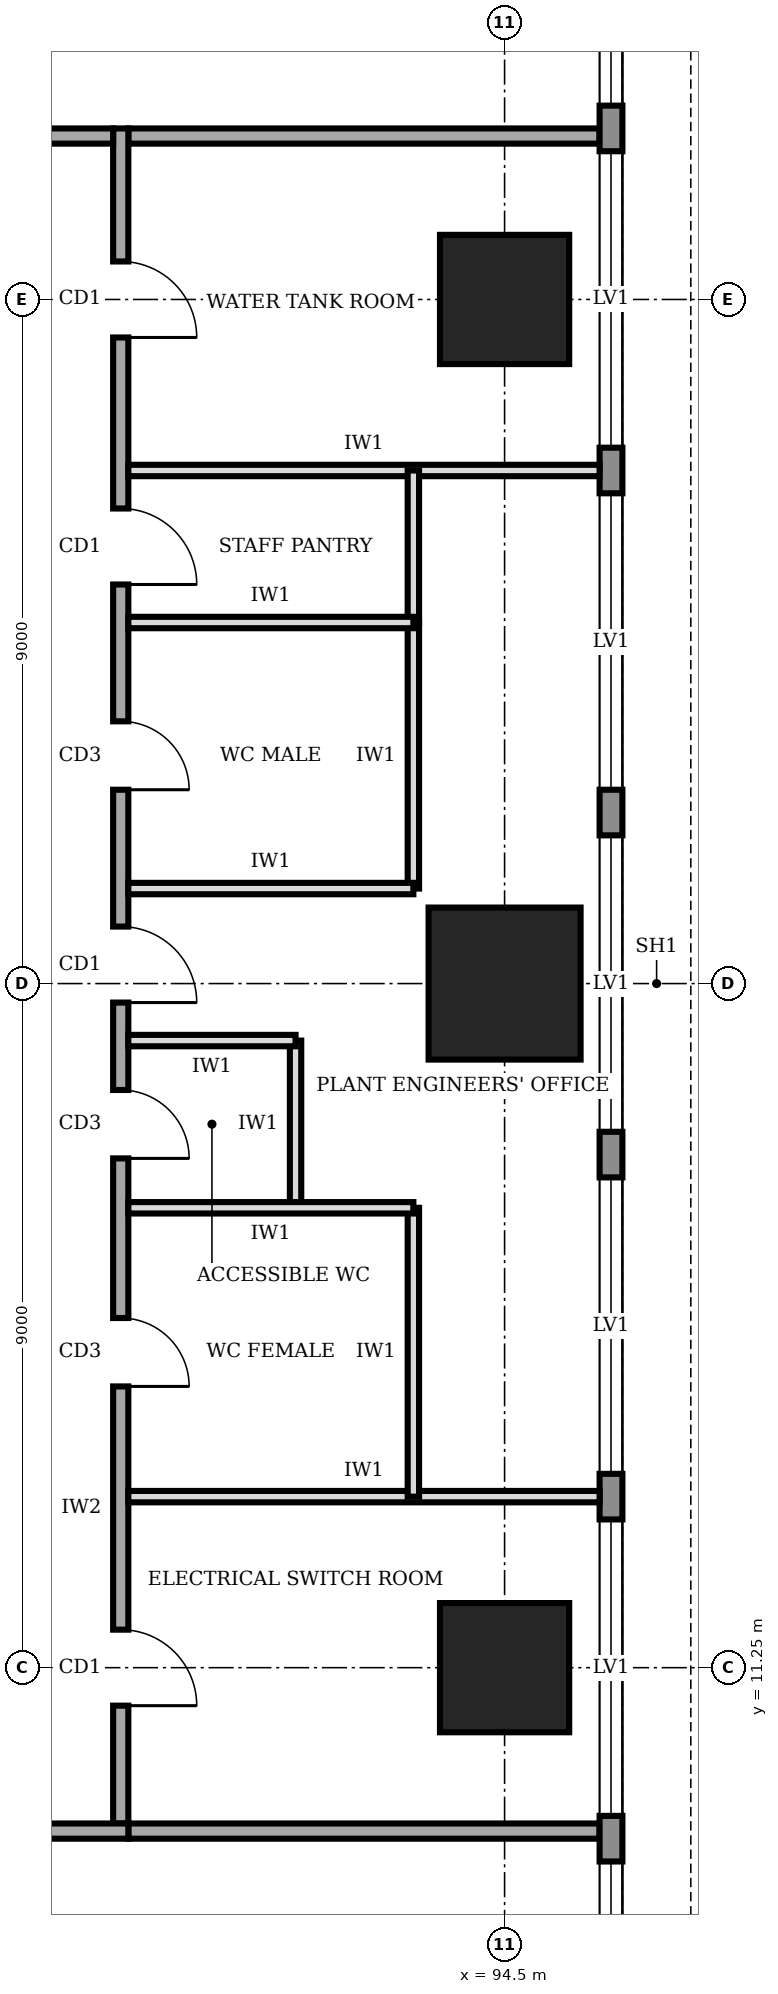
"""IFC4 building model, lengths in metres.
Left out: names, types, materials, properties, quantities, classifications, styles, units other than length and angle.
Written with IfcOpenShell. Run it as: python <this file> out.ifc"""

import sys

from ifc_helpers import new_model, si_unit, direction, frame, frame_2d, origin, origin_2d, place, context, subcontext, project, spatial, rectangle, extrude, element, fill, save


model = new_model("IFC4")
c1 = context("Model", 3, precision=1e-05, world=origin(), true_north=direction((0.0, 1.0)))
c2 = subcontext(c1, "Body", "Model", "MODEL_VIEW")
j1 = project(units=[si_unit("LENGTHUNIT", "METRE"), si_unit("PLANEANGLEUNIT", "RADIAN")], contexts=[c1])
p1 = place(None, origin())
s1 = spatial("IfcSite", under=j1, at=p1, CompositionType="ELEMENT")
p2 = place(p1, origin())
s2 = spatial("IfcBuilding", under=s1, at=p2, CompositionType="ELEMENT")
p3 = place(p2, frame((0.0, 0.0, 229.0)))
s3 = spatial("IfcBuildingStorey", under=s2, at=p3, CompositionType="ELEMENT", Elevation=229.0)
p4 = place(p3, frame((94.5, 11.25, 0.0), z_axis=(0.0, 0.0, 1.0), x_axis=(1.0, 0.0, 0.0)))
e1 = element("IfcColumn", 1, at=p4, inside=s3, PredefinedType="COLUMN", context=c2, shape_type="SweptSolid", body=[
    extrude(rectangle(XDim=1.7, YDim=1.7, at=origin_2d()), origin(), (0.0, 0.0, 1.0), 4.0),
])
p5 = place(p3, frame((94.5, 20.25, 0.0), z_axis=(0.0, 0.0, 1.0), x_axis=(1.0, 0.0, 0.0)))
e2 = element("IfcColumn", 2, at=p5, inside=s3, PredefinedType="COLUMN", context=c2, shape_type="SweptSolid", body=[
    extrude(rectangle(XDim=2.0, YDim=2.0, at=origin_2d()), origin(), (0.0, 0.0, 1.0), 4.0),
])
p6 = place(p3, frame((94.5, 29.25, 0.0), z_axis=(0.0, 0.0, 1.0), x_axis=(1.0, 0.0, 0.0)))
e3 = element("IfcColumn", 3, at=p6, inside=s3, PredefinedType="COLUMN", context=c2, shape_type="SweptSolid", body=[
    extrude(rectangle(XDim=1.7, YDim=1.7, at=origin_2d()), origin(), (0.0, 0.0, 1.0), 4.0),
])
p7 = place(p3, frame((95.9, 3.32, 0.0), z_axis=(0.0, 0.0, 1.0), x_axis=(0.0, 1.0, 0.0)))
e4 = element("IfcWall", 4, at=p7, inside=s3, PredefinedType="STANDARD", context=c2, shape_type="SweptSolid", body=[
    extrude(rectangle(XDim=33.86, YDim=0.3, at=frame_2d((16.93, 0.0))), origin(), (0.0, 0.0, 1.0), 3.75),
])
p8 = place(p7, frame((1.48, 0.0, 0.9)))
e5 = element("IfcOpeningElement", 5, at=p8, cuts=e4, PredefinedType="OPENING", context=c2, shape_type="SweptSolid", body=[
    extrude(rectangle(XDim=3.9, YDim=2.2, at=frame_2d((1.95, 1.1))), frame((0.0, 0.16, 0.0), z_axis=(0.0, -1.0, 0.0), x_axis=(1.0, 0.0, 0.0)), (0.0, 0.0, 1.0), 0.32),
])
p9 = place(p7, frame((5.98, 0.0, 0.9)))
e6 = element("IfcOpeningElement", 6, at=p9, cuts=e4, PredefinedType="OPENING", context=c2, shape_type="SweptSolid", body=[
    extrude(rectangle(XDim=3.9, YDim=2.2, at=frame_2d((1.95, 1.1))), frame((0.0, 0.16, 0.0), z_axis=(0.0, -1.0, 0.0), x_axis=(1.0, 0.0, 0.0)), (0.0, 0.0, 1.0), 0.32),
])
p10 = place(p7, frame((10.48, 0.0, 0.9)))
e7 = element("IfcOpeningElement", 7, at=p10, cuts=e4, PredefinedType="OPENING", context=c2, shape_type="SweptSolid", body=[
    extrude(rectangle(XDim=3.9, YDim=2.2, at=frame_2d((1.95, 1.1))), frame((0.0, 0.16, 0.0), z_axis=(0.0, -1.0, 0.0), x_axis=(1.0, 0.0, 0.0)), (0.0, 0.0, 1.0), 0.32),
])
p11 = place(p7, frame((14.98, 0.0, 0.9)))
e8 = element("IfcOpeningElement", 8, at=p11, cuts=e4, PredefinedType="OPENING", context=c2, shape_type="SweptSolid", body=[
    extrude(rectangle(XDim=3.9, YDim=2.2, at=frame_2d((1.95, 1.1))), frame((0.0, 0.16, 0.0), z_axis=(0.0, -1.0, 0.0), x_axis=(1.0, 0.0, 0.0)), (0.0, 0.0, 1.0), 0.32),
])
p12 = place(p7, frame((19.48, 0.0, 0.9)))
e9 = element("IfcOpeningElement", 9, at=p12, cuts=e4, PredefinedType="OPENING", context=c2, shape_type="SweptSolid", body=[
    extrude(rectangle(XDim=3.9, YDim=2.2, at=frame_2d((1.95, 1.1))), frame((0.0, 0.16, 0.0), z_axis=(0.0, -1.0, 0.0), x_axis=(1.0, 0.0, 0.0)), (0.0, 0.0, 1.0), 0.32),
])
p13 = place(p7, frame((23.98, 0.0, 0.9)))
e10 = element("IfcOpeningElement", 10, at=p13, cuts=e4, PredefinedType="OPENING", context=c2, shape_type="SweptSolid", body=[
    extrude(rectangle(XDim=3.9, YDim=2.2, at=frame_2d((1.95, 1.1))), frame((0.0, 0.16, 0.0), z_axis=(0.0, -1.0, 0.0), x_axis=(1.0, 0.0, 0.0)), (0.0, 0.0, 1.0), 0.32),
])
p14 = place(p7, frame((28.48, 0.0, 0.9)))
e11 = element("IfcOpeningElement", 11, at=p14, cuts=e4, PredefinedType="OPENING", context=c2, shape_type="SweptSolid", body=[
    extrude(rectangle(XDim=3.9, YDim=2.2, at=frame_2d((1.95, 1.1))), frame((0.0, 0.16, 0.0), z_axis=(0.0, -1.0, 0.0), x_axis=(1.0, 0.0, 0.0)), (0.0, 0.0, 1.0), 0.32),
])
p15 = place(p3, frame((72.65, 9.1, 0.0), z_axis=(0.0, 0.0, 1.0), x_axis=(1.0, 0.0, 0.0)))
e12 = element("IfcWall", 12, at=p15, inside=s3, PredefinedType="SOLIDWALL", context=c2, shape_type="SweptSolid", body=[
    extrude(rectangle(XDim=16.9, YDim=0.2, at=frame_2d((8.45, 0.0))), origin(), (0.0, 0.0, 1.0), 3.75),
])
p16 = place(p15, frame((7.15, 0.0, 0.0)))
e13 = element("IfcOpeningElement", 13, at=p16, cuts=e12, PredefinedType="OPENING", context=c2, shape_type="SweptSolid", body=[
    extrude(rectangle(XDim=2.4, YDim=2.7, at=frame_2d((1.2, 1.35))), frame((0.0, 0.11, 0.0), z_axis=(0.0, -1.0, 0.0), x_axis=(1.0, 0.0, 0.0)), (0.0, 0.0, 1.0), 0.22),
])
p17 = place(p3, frame((89.45, 9.2, 0.0), z_axis=(0.0, 0.0, 1.0), x_axis=(0.0, 1.0, 0.0)))
e14 = element("IfcWall", 14, at=p17, inside=s3, PredefinedType="SOLIDWALL", context=c2, shape_type="SweptSolid", body=[
    extrude(rectangle(XDim=22.3, YDim=0.2, at=frame_2d((11.15, 0.0))), origin(), (0.0, 0.0, 1.0), 3.75),
])
p18 = place(p17, frame((1.55, 0.0, 0.0)))
e15 = element("IfcOpeningElement", 15, at=p18, cuts=e14, PredefinedType="OPENING", context=c2, shape_type="SweptSolid", body=[
    extrude(rectangle(XDim=1.0, YDim=2.1, at=frame_2d((0.5, 1.05))), frame((0.0, 0.11, 0.0), z_axis=(0.0, -1.0, 0.0), x_axis=(1.0, 0.0, 0.0)), (0.0, 0.0, 1.0), 0.22),
])
p19 = place(p17, frame((5.75, 0.0, 0.0)))
e16 = element("IfcOpeningElement", 16, at=p19, cuts=e14, PredefinedType="OPENING", context=c2, shape_type="SweptSolid", body=[
    extrude(rectangle(XDim=0.9, YDim=2.1, at=frame_2d((0.45, 1.05))), frame((0.0, 0.11, 0.0), z_axis=(0.0, -1.0, 0.0), x_axis=(1.0, 0.0, 0.0)), (0.0, 0.0, 1.0), 0.22),
])
p20 = place(p17, frame((8.75, 0.0, 0.0)))
e17 = element("IfcOpeningElement", 17, at=p20, cuts=e14, PredefinedType="OPENING", context=c2, shape_type="SweptSolid", body=[
    extrude(rectangle(XDim=0.9, YDim=2.1, at=frame_2d((0.45, 1.05))), frame((0.0, 0.11, 0.0), z_axis=(0.0, -1.0, 0.0), x_axis=(1.0, 0.0, 0.0)), (0.0, 0.0, 1.0), 0.22),
])
p21 = place(p17, frame((13.6, 0.0, 0.0)))
e18 = element("IfcOpeningElement", 18, at=p21, cuts=e14, PredefinedType="OPENING", context=c2, shape_type="SweptSolid", body=[
    extrude(rectangle(XDim=0.9, YDim=2.1, at=frame_2d((0.45, 1.05))), frame((0.0, 0.11, 0.0), z_axis=(0.0, -1.0, 0.0), x_axis=(1.0, 0.0, 0.0)), (0.0, 0.0, 1.0), 0.22),
])
p22 = place(p17, frame((16.3, 0.0, 0.0)))
e19 = element("IfcOpeningElement", 19, at=p22, cuts=e14, PredefinedType="OPENING", context=c2, shape_type="SweptSolid", body=[
    extrude(rectangle(XDim=1.0, YDim=2.1, at=frame_2d((0.5, 1.05))), frame((0.0, 0.11, 0.0), z_axis=(0.0, -1.0, 0.0), x_axis=(1.0, 0.0, 0.0)), (0.0, 0.0, 1.0), 0.22),
])
p23 = place(p17, frame((10.8, 0.0, 0.0)))
e20 = element("IfcOpeningElement", 20, at=p23, cuts=e14, PredefinedType="OPENING", context=c2, shape_type="SweptSolid", body=[
    extrude(rectangle(XDim=1.0, YDim=2.1, at=frame_2d((0.5, 1.05))), frame((0.0, 0.11, 0.0), z_axis=(0.0, -1.0, 0.0), x_axis=(1.0, 0.0, 0.0)), (0.0, 0.0, 1.0), 0.22),
])
p24 = place(p17, frame((19.55, 0.0, 0.0)))
e21 = element("IfcOpeningElement", 21, at=p24, cuts=e14, PredefinedType="OPENING", context=c2, shape_type="SweptSolid", body=[
    extrude(rectangle(XDim=1.0, YDim=2.1, at=frame_2d((0.5, 1.05))), frame((0.0, 0.11, 0.0), z_axis=(0.0, -1.0, 0.0), x_axis=(1.0, 0.0, 0.0)), (0.0, 0.0, 1.0), 0.22),
])
p25 = place(p3, frame((89.35, 31.4, 0.0), z_axis=(0.0, 0.0, 1.0), x_axis=(-1.0, 0.0, 0.0)))
e22 = element("IfcWall", 22, at=p25, inside=s3, PredefinedType="SOLIDWALL", context=c2, shape_type="SweptSolid", body=[
    extrude(rectangle(XDim=16.9, YDim=0.2, at=frame_2d((8.45, 0.0))), origin(), (0.0, 0.0, 1.0), 3.75),
])
p26 = place(p25, frame((11.425, 0.0, 0.0)))
e23 = element("IfcOpeningElement", 23, at=p26, cuts=e22, PredefinedType="OPENING", context=c2, shape_type="SweptSolid", body=[
    extrude(rectangle(XDim=2.4, YDim=2.7, at=frame_2d((1.2, 1.35))), frame((0.0, 0.11, 0.0), z_axis=(0.0, -1.0, 0.0), x_axis=(1.0, 0.0, 0.0)), (0.0, 0.0, 1.0), 0.22),
])
p27 = place(p25, frame((3.575, 0.0, 0.0)))
e24 = element("IfcOpeningElement", 24, at=p27, cuts=e22, PredefinedType="OPENING", context=c2, shape_type="SweptSolid", body=[
    extrude(rectangle(XDim=1.0, YDim=2.1, at=frame_2d((0.5, 1.05))), frame((0.0, 0.11, 0.0), z_axis=(0.0, -1.0, 0.0), x_axis=(1.0, 0.0, 0.0)), (0.0, 0.0, 1.0), 0.22),
])
for number, where, z_axis, x_axis in (
    (25, (89.55, 9.1, 0.0), (0.0, 0.0, 1.0), (1.0, 0.0, 0.0)),
    (26, (89.55, 31.4, 0.0), (0.0, 0.0, 1.0), (1.0, 0.0, 0.0)),
):
    element("IfcWall", number, at=place(p3, frame(where, z_axis=z_axis, x_axis=x_axis)), inside=s3, PredefinedType="SOLIDWALL", context=c2, shape_type="SweptSolid", body=[
        extrude(rectangle(XDim=6.2, YDim=0.2, at=frame_2d((3.1, 0.0))), origin(), (0.0, 0.0, 1.0), 3.75),
    ])
for number, where, z_axis, x_axis in (
    (27, (89.55, 13.5, 0.0), (0.0, 0.0, 1.0), (1.0, 0.0, 0.0)),
    (28, (89.55, 27.0, 0.0), (0.0, 0.0, 1.0), (1.0, 0.0, 0.0)),
):
    element("IfcWall", number, at=place(p3, frame(where, z_axis=z_axis, x_axis=x_axis)), inside=s3, PredefinedType="PARTITIONING", context=c2, shape_type="SweptSolid", body=[
        extrude(rectangle(XDim=6.2, YDim=0.15, at=frame_2d((3.1, 0.0))), origin(), (0.0, 0.0, 1.0), 3.75),
    ])
p28 = place(p3, frame((89.55, 17.3, 0.0), z_axis=(0.0, 0.0, 1.0), x_axis=(1.0, 0.0, 0.0)))
e29 = element("IfcWall", 29, at=p28, inside=s3, PredefinedType="PARTITIONING", context=c2, shape_type="SweptSolid", body=[
    extrude(rectangle(XDim=3.75, YDim=0.15, at=frame_2d((1.875, 0.0))), origin(), (0.0, 0.0, 1.0), 3.75),
])
p29 = place(p3, frame((89.55, 19.5, 0.0), z_axis=(0.0, 0.0, 1.0), x_axis=(1.0, 0.0, 0.0)))
e30 = element("IfcWall", 30, at=p29, inside=s3, PredefinedType="PARTITIONING", context=c2, shape_type="SweptSolid", body=[
    extrude(rectangle(XDim=2.2, YDim=0.15, at=frame_2d((1.1, 0.0))), origin(), (0.0, 0.0, 1.0), 2.85),
])
for number, where, z_axis, x_axis in (
    (31, (89.55, 21.5, 0.0), (0.0, 0.0, 1.0), (1.0, 0.0, 0.0)),
    (32, (89.55, 25.0, 0.0), (0.0, 0.0, 1.0), (1.0, 0.0, 0.0)),
):
    element("IfcWall", number, at=place(p3, frame(where, z_axis=z_axis, x_axis=x_axis)), inside=s3, PredefinedType="PARTITIONING", context=c2, shape_type="SweptSolid", body=[
        extrude(rectangle(XDim=3.75, YDim=0.15, at=frame_2d((1.875, 0.0))), origin(), (0.0, 0.0, 1.0), 3.75),
    ])
p30 = place(p3, frame((93.3, 13.5, 0.0), z_axis=(0.0, 0.0, 1.0), x_axis=(0.0, 1.0, 0.0)))
e33 = element("IfcWall", 33, at=p30, inside=s3, PredefinedType="PARTITIONING", context=c2, shape_type="SweptSolid", body=[
    extrude(rectangle(XDim=3.8, YDim=0.15, at=frame_2d((1.9, 0.0))), origin(), (0.0, 0.0, 1.0), 3.75),
])
p31 = place(p3, frame((91.75, 17.3, 0.0), z_axis=(0.0, 0.0, 1.0), x_axis=(0.0, 1.0, 0.0)))
e34 = element("IfcWall", 34, at=p31, inside=s3, PredefinedType="PARTITIONING", context=c2, shape_type="SweptSolid", body=[
    extrude(rectangle(XDim=2.2, YDim=0.15, at=frame_2d((1.1, 0.0))), origin(), (0.0, 0.0, 1.0), 3.75),
])
p32 = place(p3, frame((93.3, 21.5, 0.0), z_axis=(0.0, 0.0, 1.0), x_axis=(0.0, 1.0, 0.0)))
e35 = element("IfcWall", 35, at=p32, inside=s3, PredefinedType="PARTITIONING", context=c2, shape_type="SweptSolid", body=[
    extrude(rectangle(XDim=3.5, YDim=0.15, at=frame_2d((1.75, 0.0))), origin(), (0.0, 0.0, 1.0), 3.75),
])
p33 = place(p3, frame((93.3, 25.0, 0.0), z_axis=(0.0, 0.0, 1.0), x_axis=(0.0, 1.0, 0.0)))
e36 = element("IfcWall", 36, at=p33, inside=s3, PredefinedType="PARTITIONING", context=c2, shape_type="SweptSolid", body=[
    extrude(rectangle(XDim=2.0, YDim=0.15, at=frame_2d((1.0, 0.0))), origin(), (0.0, 0.0, 1.0), 3.75),
])
p34 = place(p8, origin())
e37 = element("IfcWindow", 37, at=p34, inside=s3, PartitioningType="SINGLE_PANEL", PredefinedType="WINDOW", context=c2, shape_type="SweptSolid", body=[
    extrude(rectangle(XDim=3.9, YDim=2.2, at=frame_2d((1.95, 1.1))), frame((0.0, 0.03, 0.0), z_axis=(0.0, -1.0, 0.0), x_axis=(1.0, 0.0, 0.0)), (0.0, 0.0, 1.0), 0.06),
])
fill(e5, e37)
p35 = place(p9, origin())
e38 = element("IfcWindow", 38, at=p35, inside=s3, PartitioningType="SINGLE_PANEL", PredefinedType="WINDOW", context=c2, shape_type="SweptSolid", body=[
    extrude(rectangle(XDim=3.9, YDim=2.2, at=frame_2d((1.95, 1.1))), frame((0.0, 0.03, 0.0), z_axis=(0.0, -1.0, 0.0), x_axis=(1.0, 0.0, 0.0)), (0.0, 0.0, 1.0), 0.06),
])
fill(e6, e38)
p36 = place(p10, origin())
e39 = element("IfcWindow", 39, at=p36, inside=s3, PartitioningType="SINGLE_PANEL", PredefinedType="WINDOW", context=c2, shape_type="SweptSolid", body=[
    extrude(rectangle(XDim=3.9, YDim=2.2, at=frame_2d((1.95, 1.1))), frame((0.0, 0.03, 0.0), z_axis=(0.0, -1.0, 0.0), x_axis=(1.0, 0.0, 0.0)), (0.0, 0.0, 1.0), 0.06),
])
fill(e7, e39)
p37 = place(p11, origin())
e40 = element("IfcWindow", 40, at=p37, inside=s3, PartitioningType="SINGLE_PANEL", PredefinedType="WINDOW", context=c2, shape_type="SweptSolid", body=[
    extrude(rectangle(XDim=3.9, YDim=2.2, at=frame_2d((1.95, 1.1))), frame((0.0, 0.03, 0.0), z_axis=(0.0, -1.0, 0.0), x_axis=(1.0, 0.0, 0.0)), (0.0, 0.0, 1.0), 0.06),
])
fill(e8, e40)
p38 = place(p12, origin())
e41 = element("IfcWindow", 41, at=p38, inside=s3, PartitioningType="SINGLE_PANEL", PredefinedType="WINDOW", context=c2, shape_type="SweptSolid", body=[
    extrude(rectangle(XDim=3.9, YDim=2.2, at=frame_2d((1.95, 1.1))), frame((0.0, 0.03, 0.0), z_axis=(0.0, -1.0, 0.0), x_axis=(1.0, 0.0, 0.0)), (0.0, 0.0, 1.0), 0.06),
])
fill(e9, e41)
p39 = place(p13, origin())
e42 = element("IfcWindow", 42, at=p39, inside=s3, PartitioningType="SINGLE_PANEL", PredefinedType="WINDOW", context=c2, shape_type="SweptSolid", body=[
    extrude(rectangle(XDim=3.9, YDim=2.2, at=frame_2d((1.95, 1.1))), frame((0.0, 0.03, 0.0), z_axis=(0.0, -1.0, 0.0), x_axis=(1.0, 0.0, 0.0)), (0.0, 0.0, 1.0), 0.06),
])
fill(e10, e42)
p40 = place(p14, origin())
e43 = element("IfcWindow", 43, at=p40, inside=s3, PartitioningType="SINGLE_PANEL", PredefinedType="WINDOW", context=c2, shape_type="SweptSolid", body=[
    extrude(rectangle(XDim=3.9, YDim=2.2, at=frame_2d((1.95, 1.1))), frame((0.0, 0.03, 0.0), z_axis=(0.0, -1.0, 0.0), x_axis=(1.0, 0.0, 0.0)), (0.0, 0.0, 1.0), 0.06),
])
fill(e11, e43)
p41 = place(p18, frame((1.0, 0.0, 0.0), z_axis=(0.0, 0.0, 1.0), x_axis=(-1.0, 0.0, 0.0)))
e44 = element("IfcDoor", 44, at=p41, inside=s3, OperationType="SINGLE_SWING_RIGHT", PredefinedType="DOOR", context=c2, shape_type="SweptSolid", body=[
    extrude(rectangle(XDim=1.0, YDim=2.1, at=frame_2d((0.5, 1.05))), frame((0.0, 0.025, 0.0), z_axis=(0.0, -1.0, 0.0), x_axis=(1.0, 0.0, 0.0)), (0.0, 0.0, 1.0), 0.05),
])
fill(e15, e44)
p42 = place(p19, frame((0.9, 0.0, 0.0), z_axis=(0.0, 0.0, 1.0), x_axis=(-1.0, 0.0, 0.0)))
e45 = element("IfcDoor", 45, at=p42, inside=s3, OperationType="SINGLE_SWING_RIGHT", PredefinedType="DOOR", context=c2, shape_type="SweptSolid", body=[
    extrude(rectangle(XDim=0.9, YDim=2.1, at=frame_2d((0.45, 1.05))), frame((0.0, 0.025, 0.0), z_axis=(0.0, -1.0, 0.0), x_axis=(1.0, 0.0, 0.0)), (0.0, 0.0, 1.0), 0.05),
])
fill(e16, e45)
p43 = place(p20, frame((0.9, 0.0, 0.0), z_axis=(0.0, 0.0, 1.0), x_axis=(-1.0, 0.0, 0.0)))
e46 = element("IfcDoor", 46, at=p43, inside=s3, OperationType="SINGLE_SWING_RIGHT", PredefinedType="DOOR", context=c2, shape_type="SweptSolid", body=[
    extrude(rectangle(XDim=0.9, YDim=2.1, at=frame_2d((0.45, 1.05))), frame((0.0, 0.025, 0.0), z_axis=(0.0, -1.0, 0.0), x_axis=(1.0, 0.0, 0.0)), (0.0, 0.0, 1.0), 0.05),
])
fill(e17, e46)
p44 = place(p21, frame((0.9, 0.0, 0.0), z_axis=(0.0, 0.0, 1.0), x_axis=(-1.0, 0.0, 0.0)))
e47 = element("IfcDoor", 47, at=p44, inside=s3, OperationType="SINGLE_SWING_RIGHT", PredefinedType="DOOR", context=c2, shape_type="SweptSolid", body=[
    extrude(rectangle(XDim=0.9, YDim=2.1, at=frame_2d((0.45, 1.05))), frame((0.0, 0.025, 0.0), z_axis=(0.0, -1.0, 0.0), x_axis=(1.0, 0.0, 0.0)), (0.0, 0.0, 1.0), 0.05),
])
fill(e18, e47)
p45 = place(p22, frame((1.0, 0.0, 0.0), z_axis=(0.0, 0.0, 1.0), x_axis=(-1.0, 0.0, 0.0)))
e48 = element("IfcDoor", 48, at=p45, inside=s3, OperationType="SINGLE_SWING_RIGHT", PredefinedType="DOOR", context=c2, shape_type="SweptSolid", body=[
    extrude(rectangle(XDim=1.0, YDim=2.1, at=frame_2d((0.5, 1.05))), frame((0.0, 0.025, 0.0), z_axis=(0.0, -1.0, 0.0), x_axis=(1.0, 0.0, 0.0)), (0.0, 0.0, 1.0), 0.05),
])
fill(e19, e48)
p46 = place(p23, frame((1.0, 0.0, 0.0), z_axis=(0.0, 0.0, 1.0), x_axis=(-1.0, 0.0, 0.0)))
e49 = element("IfcDoor", 49, at=p46, inside=s3, OperationType="SINGLE_SWING_RIGHT", PredefinedType="DOOR", context=c2, shape_type="SweptSolid", body=[
    extrude(rectangle(XDim=1.0, YDim=2.1, at=frame_2d((0.5, 1.05))), frame((0.0, 0.025, 0.0), z_axis=(0.0, -1.0, 0.0), x_axis=(1.0, 0.0, 0.0)), (0.0, 0.0, 1.0), 0.05),
])
fill(e20, e49)
p47 = place(p24, frame((1.0, 0.0, 0.0), z_axis=(0.0, 0.0, 1.0), x_axis=(-1.0, 0.0, 0.0)))
e50 = element("IfcDoor", 50, at=p47, inside=s3, OperationType="SINGLE_SWING_RIGHT", PredefinedType="DOOR", context=c2, shape_type="SweptSolid", body=[
    extrude(rectangle(XDim=1.0, YDim=2.1, at=frame_2d((0.5, 1.05))), frame((0.0, 0.025, 0.0), z_axis=(0.0, -1.0, 0.0), x_axis=(1.0, 0.0, 0.0)), (0.0, 0.0, 1.0), 0.05),
])
fill(e21, e50)
save(model, sys.argv[1])
